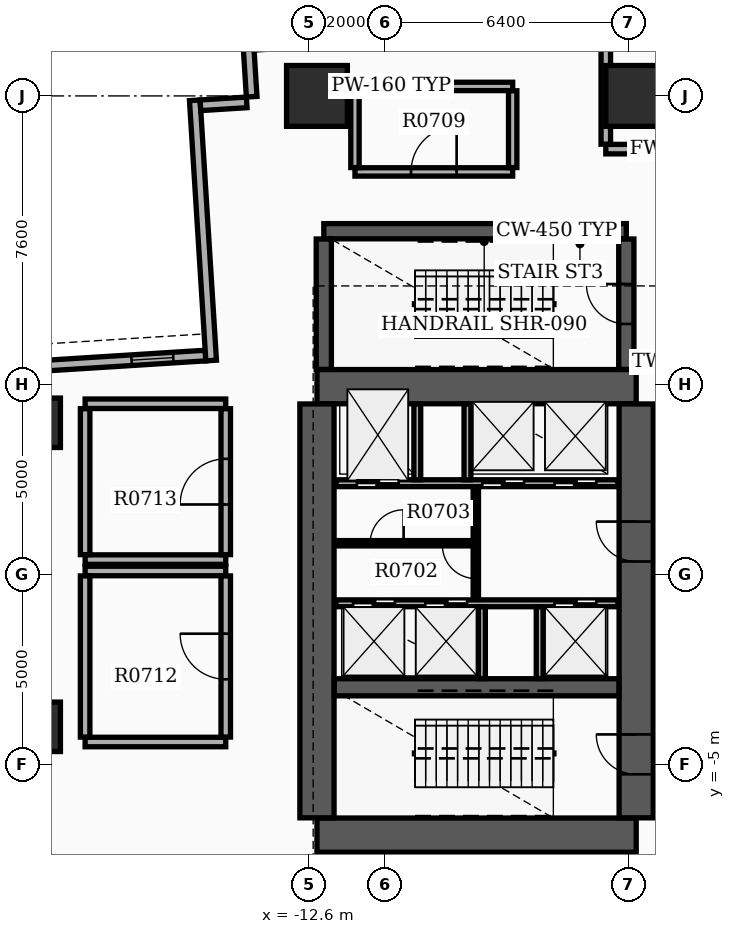
"""IFC4 building model, lengths in metres.
Left out: names, types, materials, properties, quantities, classifications, styles, units other than length and angle.
Written with IfcOpenShell. Run it as: python <this file> out.ifc"""

import sys

from ifc_helpers import new_model, si_unit, direction, frame, frame_2d, origin, origin_2d, place, context, subcontext, project, spatial, rectangle, extrude, element, fill, save


model = new_model("IFC4")
c1 = context("Model", 3, precision=1e-05, world=origin(), true_north=direction((0.0, 1.0)))
c2 = subcontext(c1, "Body", "Model", "MODEL_VIEW")
j1 = project(units=[si_unit("LENGTHUNIT", "METRE"), si_unit("PLANEANGLEUNIT", "RADIAN")], contexts=[c1])
p1 = place(None, origin())
s1 = spatial("IfcSite", under=j1, at=p1, CompositionType="ELEMENT")
p2 = place(p1, origin())
s2 = spatial("IfcBuilding", under=s1, at=p2, CompositionType="ELEMENT")
p3 = place(p2, frame((0.0, 0.0, 47.1)))
s3 = spatial("IfcBuildingStorey", under=s2, at=p3, CompositionType="ELEMENT", Elevation=47.1)
for number, where, z_axis, x_axis in (
    (1, (-12.4, -6.85, 0.0), (0.0, 0.0, 1.0), (1.0, 0.0, 0.0)),
    (2, (-12.4, 4.95, 0.0), (0.0, 0.0, 1.0), (1.0, 0.0, 0.0)),
):
    element("IfcWall", number, at=place(p3, frame(where, z_axis=z_axis, x_axis=x_axis)), inside=s3, PredefinedType="SHEAR", context=c2, shape_type="SweptSolid", body=[
        extrude(rectangle(XDim=8.4, YDim=0.9, at=frame_2d((4.2, 0.0))), origin(), (0.0, 0.0, 1.0), 4.9),
    ])
p4 = place(p3, frame((-12.4, -6.395, 0.0), z_axis=(0.0, 0.0, 1.0), x_axis=(0.0, 1.0, 0.0)))
e3 = element("IfcWall", 3, at=p4, inside=s3, PredefinedType="SHEAR", context=c2, shape_type="SweptSolid", body=[
    extrude(rectangle(XDim=10.89, YDim=0.9, at=frame_2d((5.445, 0.0))), origin(), (0.0, 0.0, 1.0), 4.9),
])
p5 = place(p3, frame((-4.0, -6.395, 0.0), z_axis=(0.0, 0.0, 1.0), x_axis=(0.0, 1.0, 0.0)))
e4 = element("IfcWall", 4, at=p5, inside=s3, PredefinedType="SHEAR", context=c2, shape_type="SweptSolid", body=[
    extrude(rectangle(XDim=10.89, YDim=0.9, at=frame_2d((5.445, 0.0))), origin(), (0.0, 0.0, 1.0), 4.9),
])
p6 = place(p5, frame((1.145, 0.0, 0.0)))
e5 = element("IfcOpeningElement", 5, at=p6, cuts=e4, PredefinedType="OPENING", context=c2, shape_type="SweptSolid", body=[
    extrude(rectangle(XDim=1.05, YDim=2.15, at=frame_2d((0.525, 1.075))), frame((0.0, 0.46, 0.0), z_axis=(0.0, -1.0, 0.0), x_axis=(1.0, 0.0, 0.0)), (0.0, 0.0, 1.0), 0.92),
])
p7 = place(p5, frame((6.745, 0.0, 0.0)))
e6 = element("IfcOpeningElement", 6, at=p7, cuts=e4, PredefinedType="OPENING", context=c2, shape_type="SweptSolid", body=[
    extrude(rectangle(XDim=1.05, YDim=2.15, at=frame_2d((0.525, 1.075))), frame((0.0, 0.46, 0.0), z_axis=(0.0, -1.0, 0.0), x_axis=(1.0, 0.0, 0.0)), (0.0, 0.0, 1.0), 0.92),
])
p8 = place(p3, frame((-11.945, -2.96, 0.0), z_axis=(0.0, 0.0, 1.0), x_axis=(1.0, 0.0, 0.0)))
e7 = element("IfcWall", 7, at=p8, inside=s3, PredefinedType="SHEAR", context=c2, shape_type="SweptSolid", body=[
    extrude(rectangle(XDim=7.49, YDim=0.45, at=frame_2d((3.745, 0.0))), origin(), (0.0, 0.0, 1.0), 4.9),
])
p9 = place(p3, frame((-12.22, 9.04, 0.0), z_axis=(0.0, 0.0, 1.0), x_axis=(1.0, 0.0, 0.0)))
e8 = element("IfcWall", 8, at=p9, inside=s3, PredefinedType="SHEAR", context=c2, shape_type="SweptSolid", body=[
    extrude(rectangle(XDim=7.96, YDim=0.4, at=frame_2d((3.98, 0.0))), origin(), (0.0, 0.0, 1.0), 4.9),
])
p10 = place(p3, frame((-12.22, 5.405, 0.0), z_axis=(0.0, 0.0, 1.0), x_axis=(0.0, 1.0, 0.0)))
e9 = element("IfcWall", 9, at=p10, inside=s3, PredefinedType="SHEAR", context=c2, shape_type="SweptSolid", body=[
    extrude(rectangle(XDim=3.43, YDim=0.4, at=frame_2d((1.715, 0.0))), origin(), (0.0, 0.0, 1.0), 4.9),
])
p11 = place(p3, frame((-4.26, 5.405, 0.0), z_axis=(0.0, 0.0, 1.0), x_axis=(0.0, 1.0, 0.0)))
e10 = element("IfcWall", 10, at=p11, inside=s3, PredefinedType="SHEAR", context=c2, shape_type="SweptSolid", body=[
    extrude(rectangle(XDim=3.43, YDim=0.4, at=frame_2d((1.715, 0.0))), origin(), (0.0, 0.0, 1.0), 4.9),
])
p12 = place(p11, frame((1.195, 0.0, 0.0)))
e11 = element("IfcOpeningElement", 11, at=p12, cuts=e10, PredefinedType="OPENING", context=c2, shape_type="SweptSolid", body=[
    extrude(rectangle(XDim=1.05, YDim=2.15, at=frame_2d((0.525, 1.075))), frame((0.0, 0.21, 0.0), z_axis=(0.0, -1.0, 0.0), x_axis=(1.0, 0.0, 0.0)), (0.0, 0.0, 1.0), 0.42),
])
for number, where, z_axis, x_axis in (
    (12, (-12.4, 12.6, 0.0), (0.0, 0.0, 1.0), (1.0, 0.0, 0.0)),
    (13, (-4.0, 12.6, 0.0), (0.0, 0.0, 1.0), (1.0, 0.0, 0.0)),
):
    element("IfcColumn", number, at=place(p3, frame(where, z_axis=z_axis, x_axis=x_axis)), inside=s3, PredefinedType="COLUMN", context=c2, shape_type="SweptSolid", body=[
        extrude(rectangle(XDim=1.6, YDim=1.6, at=origin_2d()), origin(), (0.0, 0.0, 1.0), 5.1),
    ])
for number, where, z_axis, x_axis in (
    (14, (-19.8, -4.0, 0.0), (0.0, 0.0, 1.0), (1.0, 0.0, 0.0)),
    (15, (-19.8, 4.0, 0.0), (0.0, 0.0, 1.0), (1.0, 0.0, 0.0)),
):
    element("IfcColumn", number, at=place(p3, frame(where, z_axis=z_axis, x_axis=x_axis)), inside=s3, PredefinedType="COLUMN", context=c2, shape_type="SweptSolid", body=[
        extrude(rectangle(XDim=1.3, YDim=1.3, at=origin_2d()), origin(), (0.0, 0.0, 1.0), 5.1),
    ])
p13 = place(p3, frame((-15.333, 5.769, 0.0), z_axis=(0.0, 0.0, 1.0), x_axis=(-0.998027116198, -0.062784355807, 0.0)))
e16 = element("IfcWall", 16, at=p13, inside=s3, PredefinedType="STANDARD", context=c2, shape_type="SweptSolid", body=[
    extrude(rectangle(XDim=20.1, YDim=0.28, at=frame_2d((10.05, 0.0))), origin(), (0.0, 0.0, 1.0), 3.98),
])
p14 = place(p13, frame((0.85, 0.0, 0.95)))
e17 = element("IfcOpeningElement", 17, at=p14, cuts=e16, PredefinedType="OPENING", context=c2, shape_type="SweptSolid", body=[
    extrude(rectangle(XDim=1.1, YDim=1.2, at=frame_2d((0.55, 0.6))), frame((0.0, 0.15, 0.0), z_axis=(0.0, -1.0, 0.0), x_axis=(1.0, 0.0, 0.0)), (0.0, 0.0, 1.0), 0.3),
])
p15 = place(p3, frame((-15.184, 5.638, 0.0), z_axis=(0.0, 0.0, 1.0), x_axis=(-0.062779317195, 0.998027433156, 0.0)))
e18 = element("IfcWall", 18, at=p15, inside=s3, PredefinedType="STANDARD", context=c2, shape_type="SweptSolid", body=[
    extrude(rectangle(XDim=6.86, YDim=0.28, at=frame_2d((3.43, 0.0))), origin(), (0.0, 0.0, 1.0), 3.98),
])
p16 = place(p3, frame((-15.466, 12.353, 0.0), z_axis=(0.0, 0.0, 1.0), x_axis=(0.998024450254, 0.062826719603, 0.0)))
e19 = element("IfcWall", 19, at=p16, inside=s3, PredefinedType="STANDARD", context=c2, shape_type="SweptSolid", body=[
    extrude(rectangle(XDim=1.22, YDim=0.28, at=frame_2d((0.61, 0.0))), origin(), (0.0, 0.0, 1.0), 3.98),
])
p17 = place(p3, frame((-14.118, 12.578, 0.0), z_axis=(0.0, 0.0, 1.0), x_axis=(-0.062824119533, 0.998024613927, 0.0)))
e20 = element("IfcWall", 20, at=p17, inside=s3, PredefinedType="STANDARD", context=c2, shape_type="SweptSolid", body=[
    extrude(rectangle(XDim=1.5, YDim=0.28, at=frame_2d((0.75, 0.0))), origin(), (0.0, 0.0, 1.0), 3.98),
])
p18 = place(p3, frame((-11.9, 2.41, 0.0), z_axis=(0.0, 0.0, 1.0), x_axis=(1.0, 0.0, 0.0)))
e21 = element("IfcWall", 21, at=p18, inside=s3, PredefinedType="SOLIDWALL", context=c2, shape_type="SweptSolid", body=[
    extrude(rectangle(XDim=7.42, YDim=0.18, at=frame_2d((3.71, 0.0))), origin(), (0.0, 0.0, 1.0), 3.97),
])
p19 = place(p18, frame((0.55, 0.0, 0.0)))
e22 = element("IfcOpeningElement", 22, at=p19, cuts=e21, PredefinedType="OPENING", context=c2, shape_type="SweptSolid", body=[
    extrude(rectangle(XDim=1.1, YDim=2.15, at=frame_2d((0.55, 1.075))), frame((0.0, 0.1, 0.0), z_axis=(0.0, -1.0, 0.0), x_axis=(1.0, 0.0, 0.0)), (0.0, 0.0, 1.0), 0.2),
])
p20 = place(p18, frame((3.85, 0.0, 0.0)))
e23 = element("IfcOpeningElement", 23, at=p20, cuts=e21, PredefinedType="OPENING", context=c2, shape_type="SweptSolid", body=[
    extrude(rectangle(XDim=1.1, YDim=2.15, at=frame_2d((0.55, 1.075))), frame((0.0, 0.1, 0.0), z_axis=(0.0, -1.0, 0.0), x_axis=(1.0, 0.0, 0.0)), (0.0, 0.0, 1.0), 0.2),
])
p21 = place(p18, frame((5.75, 0.0, 0.0)))
e24 = element("IfcOpeningElement", 24, at=p21, cuts=e21, PredefinedType="OPENING", context=c2, shape_type="SweptSolid", body=[
    extrude(rectangle(XDim=1.1, YDim=2.15, at=frame_2d((0.55, 1.075))), frame((0.0, 0.1, 0.0), z_axis=(0.0, -1.0, 0.0), x_axis=(1.0, 0.0, 0.0)), (0.0, 0.0, 1.0), 0.2),
])
p22 = place(p3, frame((-11.9, -0.75, 0.0), z_axis=(0.0, 0.0, 1.0), x_axis=(1.0, 0.0, 0.0)))
e25 = element("IfcWall", 25, at=p22, inside=s3, PredefinedType="SOLIDWALL", context=c2, shape_type="SweptSolid", body=[
    extrude(rectangle(XDim=7.42, YDim=0.18, at=frame_2d((3.71, 0.0))), origin(), (0.0, 0.0, 1.0), 3.97),
])
p23 = place(p22, frame((0.45, 0.0, 0.0)))
e26 = element("IfcOpeningElement", 26, at=p23, cuts=e25, PredefinedType="OPENING", context=c2, shape_type="SweptSolid", body=[
    extrude(rectangle(XDim=1.1, YDim=2.15, at=frame_2d((0.55, 1.075))), frame((0.0, 0.1, 0.0), z_axis=(0.0, -1.0, 0.0), x_axis=(1.0, 0.0, 0.0)), (0.0, 0.0, 1.0), 0.2),
])
p24 = place(p22, frame((2.35, 0.0, 0.0)))
e27 = element("IfcOpeningElement", 27, at=p24, cuts=e25, PredefinedType="OPENING", context=c2, shape_type="SweptSolid", body=[
    extrude(rectangle(XDim=1.1, YDim=2.15, at=frame_2d((0.55, 1.075))), frame((0.0, 0.1, 0.0), z_axis=(0.0, -1.0, 0.0), x_axis=(1.0, 0.0, 0.0)), (0.0, 0.0, 1.0), 0.2),
])
p25 = place(p22, frame((5.75, 0.0, 0.0)))
e28 = element("IfcOpeningElement", 28, at=p25, cuts=e25, PredefinedType="OPENING", context=c2, shape_type="SweptSolid", body=[
    extrude(rectangle(XDim=1.1, YDim=2.15, at=frame_2d((0.55, 1.075))), frame((0.0, 0.1, 0.0), z_axis=(0.0, -1.0, 0.0), x_axis=(1.0, 0.0, 0.0)), (0.0, 0.0, 1.0), 0.2),
])
for number, where, z_axis, x_axis in (
    (29, (-9.76, 2.5, 0.0), (0.0, 0.0, 1.0), (0.0, 1.0, 0.0)),
    (30, (-8.44, 2.5, 0.0), (0.0, 0.0, 1.0), (0.0, 1.0, 0.0)),
):
    element("IfcWall", number, at=place(p3, frame(where, z_axis=z_axis, x_axis=x_axis)), inside=s3, PredefinedType="SOLIDWALL", context=c2, shape_type="SweptSolid", body=[
        extrude(rectangle(XDim=1.99, YDim=0.18, at=frame_2d((0.995, 0.0))), origin(), (0.0, 0.0, 1.0), 3.97),
    ])
for number, where, z_axis, x_axis in (
    (31, (-8.06, -2.73, 0.0), (0.0, 0.0, 1.0), (0.0, 1.0, 0.0)),
    (32, (-6.54, -2.73, 0.0), (0.0, 0.0, 1.0), (0.0, 1.0, 0.0)),
):
    element("IfcWall", number, at=place(p3, frame(where, z_axis=z_axis, x_axis=x_axis)), inside=s3, PredefinedType="SOLIDWALL", context=c2, shape_type="SweptSolid", body=[
        extrude(rectangle(XDim=1.89, YDim=0.18, at=frame_2d((0.945, 0.0))), origin(), (0.0, 0.0, 1.0), 3.97),
    ])
p26 = place(p3, frame((-8.22, -0.65, 0.0), z_axis=(0.0, 0.0, 1.0), x_axis=(0.0, 1.0, 0.0)))
e33 = element("IfcWall", 33, at=p26, inside=s3, PredefinedType="SOLIDWALL", context=c2, shape_type="SweptSolid", body=[
    extrude(rectangle(XDim=2.96, YDim=0.14, at=frame_2d((1.48, 0.0))), origin(), (0.0, 0.0, 1.0), 3.97),
])
p27 = place(p26, frame((0.55, 0.0, 0.0)))
e34 = element("IfcOpeningElement", 34, at=p27, cuts=e33, PredefinedType="OPENING", context=c2, shape_type="SweptSolid", body=[
    extrude(rectangle(XDim=0.88, YDim=2.1, at=frame_2d((0.44, 1.05))), frame((0.0, 0.08, 0.0), z_axis=(0.0, -1.0, 0.0), x_axis=(1.0, 0.0, 0.0)), (0.0, 0.0, 1.0), 0.16),
])
p28 = place(p3, frame((-11.85, 0.83, 0.0), z_axis=(0.0, 0.0, 1.0), x_axis=(1.0, 0.0, 0.0)))
e35 = element("IfcWall", 35, at=p28, inside=s3, PredefinedType="PARTITIONING", context=c2, shape_type="SweptSolid", body=[
    extrude(rectangle(XDim=3.552, YDim=0.14, at=frame_2d((1.776, 0.0))), origin(), (0.0, 0.0, 1.0), 3.97),
])
p29 = place(p28, frame((0.85, 0.0, 0.0)))
e36 = element("IfcOpeningElement", 36, at=p29, cuts=e35, PredefinedType="OPENING", context=c2, shape_type="SweptSolid", body=[
    extrude(rectangle(XDim=0.88, YDim=2.1, at=frame_2d((0.44, 1.05))), frame((0.0, 0.08, 0.0), z_axis=(0.0, -1.0, 0.0), x_axis=(1.0, 0.0, 0.0)), (0.0, 0.0, 1.0), 0.16),
])
p30 = place(p3, frame((-4.8, 11.2, 0.0), z_axis=(0.0, 0.0, 1.0), x_axis=(1.0, 0.0, 0.0)))
e37 = element("IfcWall", 37, at=p30, inside=s3, PredefinedType="SOLIDWALL", context=c2, shape_type="SweptSolid", body=[
    extrude(rectangle(XDim=9.6, YDim=0.25, at=frame_2d((4.8, 0.0))), origin(), (0.0, 0.0, 1.0), 3.97),
])
p31 = place(p30, frame((4.2, 0.0, 0.0)))
e38 = element("IfcOpeningElement", 38, at=p31, cuts=e37, PredefinedType="OPENING", context=c2, shape_type="SweptSolid", body=[
    extrude(rectangle(XDim=1.2, YDim=2.15, at=frame_2d((0.6, 1.075))), frame((0.0, 0.135, 0.0), z_axis=(0.0, -1.0, 0.0), x_axis=(1.0, 0.0, 0.0)), (0.0, 0.0, 1.0), 0.27),
])
p32 = place(p3, frame((-4.8, 11.33, 0.0), z_axis=(0.0, 0.0, 1.0), x_axis=(0.0, 1.0, 0.0)))
e39 = element("IfcWall", 39, at=p32, inside=s3, PredefinedType="SOLIDWALL", context=c2, shape_type="SweptSolid", body=[
    extrude(rectangle(XDim=7.04, YDim=0.25, at=frame_2d((3.52, 0.0))), origin(), (0.0, 0.0, 1.0), 3.97),
])
p33 = place(p3, frame((-11.4, 10.6, 0.0), z_axis=(0.0, 0.0, 1.0), x_axis=(1.0, 0.0, 0.0)))
e40 = element("IfcWall", 40, at=p33, inside=s3, PredefinedType="PARTITIONING", context=c2, shape_type="SweptSolid", body=[
    extrude(rectangle(XDim=4.15, YDim=0.22, at=frame_2d((2.075, 0.0))), origin(), (0.0, 0.0, 1.0), 3.97),
])
p34 = place(p33, frame((1.475, 0.0, 0.0)))
e41 = element("IfcOpeningElement", 41, at=p34, cuts=e40, PredefinedType="OPENING", context=c2, shape_type="SweptSolid", body=[
    extrude(rectangle(XDim=1.2, YDim=2.15, at=frame_2d((0.6, 1.075))), frame((0.0, 0.12, 0.0), z_axis=(0.0, -1.0, 0.0), x_axis=(1.0, 0.0, 0.0)), (0.0, 0.0, 1.0), 0.24),
])
p35 = place(p3, frame((-11.4, 12.85, 0.0), z_axis=(0.0, 0.0, 1.0), x_axis=(1.0, 0.0, 0.0)))
e42 = element("IfcWall", 42, at=p35, inside=s3, PredefinedType="PARTITIONING", context=c2, shape_type="SweptSolid", body=[
    extrude(rectangle(XDim=4.15, YDim=0.22, at=frame_2d((2.075, 0.0))), origin(), (0.0, 0.0, 1.0), 3.97),
])
for number, where, z_axis, x_axis in (
    (43, (-11.4, 10.715, 0.0), (0.0, 0.0, 1.0), (0.0, 1.0, 0.0)),
    (44, (-7.25, 10.715, 0.0), (0.0, 0.0, 1.0), (0.0, 1.0, 0.0)),
):
    element("IfcWall", number, at=place(p3, frame(where, z_axis=z_axis, x_axis=x_axis)), inside=s3, PredefinedType="PARTITIONING", context=c2, shape_type="SweptSolid", body=[
        extrude(rectangle(XDim=2.02, YDim=0.22, at=frame_2d((1.01, 0.0))), origin(), (0.0, 0.0, 1.0), 3.97),
    ])
for number, where, z_axis, x_axis in (
    (45, (-18.5, -4.4, 0.0), (0.0, 0.0, 1.0), (1.0, 0.0, 0.0)),
    (46, (-18.5, 0.1, 0.0), (0.0, 0.0, 1.0), (1.0, 0.0, 0.0)),
):
    element("IfcWall", number, at=place(p3, frame(where, z_axis=z_axis, x_axis=x_axis)), inside=s3, PredefinedType="SOLIDWALL", context=c2, shape_type="SweptSolid", body=[
        extrude(rectangle(XDim=3.7, YDim=0.25, at=frame_2d((1.85, 0.0))), origin(), (0.0, 0.0, 1.0), 3.97),
    ])
p36 = place(p3, frame((-18.5, -4.27, 0.0), z_axis=(0.0, 0.0, 1.0), x_axis=(0.0, 1.0, 0.0)))
e47 = element("IfcWall", 47, at=p36, inside=s3, PredefinedType="SOLIDWALL", context=c2, shape_type="SweptSolid", body=[
    extrude(rectangle(XDim=4.24, YDim=0.25, at=frame_2d((2.12, 0.0))), origin(), (0.0, 0.0, 1.0), 3.97),
])
p37 = place(p3, frame((-14.8, -4.27, 0.0), z_axis=(0.0, 0.0, 1.0), x_axis=(0.0, 1.0, 0.0)))
e48 = element("IfcWall", 48, at=p37, inside=s3, PredefinedType="SOLIDWALL", context=c2, shape_type="SweptSolid", body=[
    extrude(rectangle(XDim=4.24, YDim=0.25, at=frame_2d((2.12, 0.0))), origin(), (0.0, 0.0, 1.0), 3.97),
])
p38 = place(p37, frame((1.52, 0.0, 0.0)))
e49 = element("IfcOpeningElement", 49, at=p38, cuts=e48, PredefinedType="OPENING", context=c2, shape_type="SweptSolid", body=[
    extrude(rectangle(XDim=1.2, YDim=2.15, at=frame_2d((0.6, 1.075))), frame((0.0, 0.135, 0.0), z_axis=(0.0, -1.0, 0.0), x_axis=(1.0, 0.0, 0.0)), (0.0, 0.0, 1.0), 0.27),
])
for number, where, z_axis, x_axis in (
    (50, (-18.5, 0.4, 0.0), (0.0, 0.0, 1.0), (1.0, 0.0, 0.0)),
    (51, (-18.5, 4.5, 0.0), (0.0, 0.0, 1.0), (1.0, 0.0, 0.0)),
):
    element("IfcWall", number, at=place(p3, frame(where, z_axis=z_axis, x_axis=x_axis)), inside=s3, PredefinedType="SOLIDWALL", context=c2, shape_type="SweptSolid", body=[
        extrude(rectangle(XDim=3.7, YDim=0.25, at=frame_2d((1.85, 0.0))), origin(), (0.0, 0.0, 1.0), 3.97),
    ])
p39 = place(p3, frame((-18.5, 0.53, 0.0), z_axis=(0.0, 0.0, 1.0), x_axis=(0.0, 1.0, 0.0)))
e52 = element("IfcWall", 52, at=p39, inside=s3, PredefinedType="SOLIDWALL", context=c2, shape_type="SweptSolid", body=[
    extrude(rectangle(XDim=3.84, YDim=0.25, at=frame_2d((1.92, 0.0))), origin(), (0.0, 0.0, 1.0), 3.97),
])
p40 = place(p3, frame((-14.8, 0.53, 0.0), z_axis=(0.0, 0.0, 1.0), x_axis=(0.0, 1.0, 0.0)))
e53 = element("IfcWall", 53, at=p40, inside=s3, PredefinedType="SOLIDWALL", context=c2, shape_type="SweptSolid", body=[
    extrude(rectangle(XDim=3.84, YDim=0.25, at=frame_2d((1.92, 0.0))), origin(), (0.0, 0.0, 1.0), 3.97),
])
p41 = place(p40, frame((1.32, 0.0, 0.0)))
e54 = element("IfcOpeningElement", 54, at=p41, cuts=e53, PredefinedType="OPENING", context=c2, shape_type="SweptSolid", body=[
    extrude(rectangle(XDim=1.2, YDim=2.15, at=frame_2d((0.6, 1.075))), frame((0.0, 0.135, 0.0), z_axis=(0.0, -1.0, 0.0), x_axis=(1.0, 0.0, 0.0)), (0.0, 0.0, 1.0), 0.27),
])
p42 = place(p14, origin())
e55 = element("IfcWindow", 55, at=p42, inside=s3, PartitioningType="SINGLE_PANEL", PredefinedType="WINDOW", context=c2, shape_type="SweptSolid", body=[
    extrude(rectangle(XDim=1.1, YDim=1.2, at=frame_2d((0.55, 0.6))), frame((0.0, 0.03, 0.0), z_axis=(0.0, -1.0, 0.0), x_axis=(1.0, 0.0, 0.0)), (0.0, 0.0, 1.0), 0.06),
])
fill(e17, e55)
p43 = place(p6, origin())
e56 = element("IfcDoor", 56, at=p43, inside=s3, OperationType="SINGLE_SWING_RIGHT", PredefinedType="DOOR", context=c2, shape_type="SweptSolid", body=[
    extrude(rectangle(XDim=1.05, YDim=2.15, at=frame_2d((0.525, 1.075))), frame((0.0, 0.025, 0.0), z_axis=(0.0, -1.0, 0.0), x_axis=(1.0, 0.0, 0.0)), (0.0, 0.0, 1.0), 0.05),
])
fill(e5, e56)
p44 = place(p7, origin())
e57 = element("IfcDoor", 57, at=p44, inside=s3, OperationType="SINGLE_SWING_RIGHT", PredefinedType="DOOR", context=c2, shape_type="SweptSolid", body=[
    extrude(rectangle(XDim=1.05, YDim=2.15, at=frame_2d((0.525, 1.075))), frame((0.0, 0.025, 0.0), z_axis=(0.0, -1.0, 0.0), x_axis=(1.0, 0.0, 0.0)), (0.0, 0.0, 1.0), 0.05),
])
fill(e6, e57)
p45 = place(p12, origin())
e58 = element("IfcDoor", 58, at=p45, inside=s3, OperationType="SINGLE_SWING_RIGHT", PredefinedType="DOOR", context=c2, shape_type="SweptSolid", body=[
    extrude(rectangle(XDim=1.05, YDim=2.15, at=frame_2d((0.525, 1.075))), frame((0.0, 0.025, 0.0), z_axis=(0.0, -1.0, 0.0), x_axis=(1.0, 0.0, 0.0)), (0.0, 0.0, 1.0), 0.05),
])
fill(e11, e58)
p46 = place(p19, origin())
e59 = element("IfcDoor", 59, at=p46, inside=s3, OperationType="DOUBLE_DOOR_SLIDING", PredefinedType="DOOR", context=c2, shape_type="SweptSolid", body=[
    extrude(rectangle(XDim=1.1, YDim=2.15, at=frame_2d((0.55, 1.075))), frame((0.0, 0.025, 0.0), z_axis=(0.0, -1.0, 0.0), x_axis=(1.0, 0.0, 0.0)), (0.0, 0.0, 1.0), 0.05),
])
fill(e22, e59)
p47 = place(p20, origin())
e60 = element("IfcDoor", 60, at=p47, inside=s3, OperationType="DOUBLE_DOOR_SLIDING", PredefinedType="DOOR", context=c2, shape_type="SweptSolid", body=[
    extrude(rectangle(XDim=1.1, YDim=2.15, at=frame_2d((0.55, 1.075))), frame((0.0, 0.025, 0.0), z_axis=(0.0, -1.0, 0.0), x_axis=(1.0, 0.0, 0.0)), (0.0, 0.0, 1.0), 0.05),
])
fill(e23, e60)
p48 = place(p21, origin())
e61 = element("IfcDoor", 61, at=p48, inside=s3, OperationType="DOUBLE_DOOR_SLIDING", PredefinedType="DOOR", context=c2, shape_type="SweptSolid", body=[
    extrude(rectangle(XDim=1.1, YDim=2.15, at=frame_2d((0.55, 1.075))), frame((0.0, 0.025, 0.0), z_axis=(0.0, -1.0, 0.0), x_axis=(1.0, 0.0, 0.0)), (0.0, 0.0, 1.0), 0.05),
])
fill(e24, e61)
p49 = place(p23, origin())
e62 = element("IfcDoor", 62, at=p49, inside=s3, OperationType="DOUBLE_DOOR_SLIDING", PredefinedType="DOOR", context=c2, shape_type="SweptSolid", body=[
    extrude(rectangle(XDim=1.1, YDim=2.15, at=frame_2d((0.55, 1.075))), frame((0.0, 0.025, 0.0), z_axis=(0.0, -1.0, 0.0), x_axis=(1.0, 0.0, 0.0)), (0.0, 0.0, 1.0), 0.05),
])
fill(e26, e62)
p50 = place(p24, origin())
e63 = element("IfcDoor", 63, at=p50, inside=s3, OperationType="DOUBLE_DOOR_SLIDING", PredefinedType="DOOR", context=c2, shape_type="SweptSolid", body=[
    extrude(rectangle(XDim=1.1, YDim=2.15, at=frame_2d((0.55, 1.075))), frame((0.0, 0.025, 0.0), z_axis=(0.0, -1.0, 0.0), x_axis=(1.0, 0.0, 0.0)), (0.0, 0.0, 1.0), 0.05),
])
fill(e27, e63)
p51 = place(p25, origin())
e64 = element("IfcDoor", 64, at=p51, inside=s3, OperationType="DOUBLE_DOOR_SLIDING", PredefinedType="DOOR", context=c2, shape_type="SweptSolid", body=[
    extrude(rectangle(XDim=1.1, YDim=2.15, at=frame_2d((0.55, 1.075))), frame((0.0, 0.025, 0.0), z_axis=(0.0, -1.0, 0.0), x_axis=(1.0, 0.0, 0.0)), (0.0, 0.0, 1.0), 0.05),
])
fill(e28, e64)
p52 = place(p27, origin())
e65 = element("IfcDoor", 65, at=p52, inside=s3, OperationType="SINGLE_SWING_RIGHT", PredefinedType="DOOR", context=c2, shape_type="SweptSolid", body=[
    extrude(rectangle(XDim=0.88, YDim=2.1, at=frame_2d((0.44, 1.05))), frame((0.0, 0.025, 0.0), z_axis=(0.0, -1.0, 0.0), x_axis=(1.0, 0.0, 0.0)), (0.0, 0.0, 1.0), 0.05),
])
fill(e34, e65)
p53 = place(p29, origin())
e66 = element("IfcDoor", 66, at=p53, inside=s3, OperationType="SINGLE_SWING_RIGHT", PredefinedType="DOOR", context=c2, shape_type="SweptSolid", body=[
    extrude(rectangle(XDim=0.88, YDim=2.1, at=frame_2d((0.44, 1.05))), frame((0.0, 0.025, 0.0), z_axis=(0.0, -1.0, 0.0), x_axis=(1.0, 0.0, 0.0)), (0.0, 0.0, 1.0), 0.05),
])
fill(e36, e66)
p54 = place(p34, origin())
e67 = element("IfcDoor", 67, at=p54, inside=s3, OperationType="SINGLE_SWING_RIGHT", PredefinedType="DOOR", context=c2, shape_type="SweptSolid", body=[
    extrude(rectangle(XDim=1.2, YDim=2.15, at=frame_2d((0.6, 1.075))), frame((0.0, 0.025, 0.0), z_axis=(0.0, -1.0, 0.0), x_axis=(1.0, 0.0, 0.0)), (0.0, 0.0, 1.0), 0.05),
])
fill(e41, e67)
p55 = place(p38, origin())
e68 = element("IfcDoor", 68, at=p55, inside=s3, OperationType="SINGLE_SWING_RIGHT", PredefinedType="DOOR", context=c2, shape_type="SweptSolid", body=[
    extrude(rectangle(XDim=1.2, YDim=2.15, at=frame_2d((0.6, 1.075))), frame((0.0, 0.025, 0.0), z_axis=(0.0, -1.0, 0.0), x_axis=(1.0, 0.0, 0.0)), (0.0, 0.0, 1.0), 0.05),
])
fill(e49, e68)
p56 = place(p41, origin())
e69 = element("IfcDoor", 69, at=p56, inside=s3, OperationType="SINGLE_SWING_LEFT", PredefinedType="DOOR", context=c2, shape_type="SweptSolid", body=[
    extrude(rectangle(XDim=1.2, YDim=2.15, at=frame_2d((0.6, 1.075))), frame((0.0, 0.025, 0.0), z_axis=(0.0, -1.0, 0.0), x_axis=(1.0, 0.0, 0.0)), (0.0, 0.0, 1.0), 0.05),
])
fill(e54, e69)
save(model, sys.argv[1])
